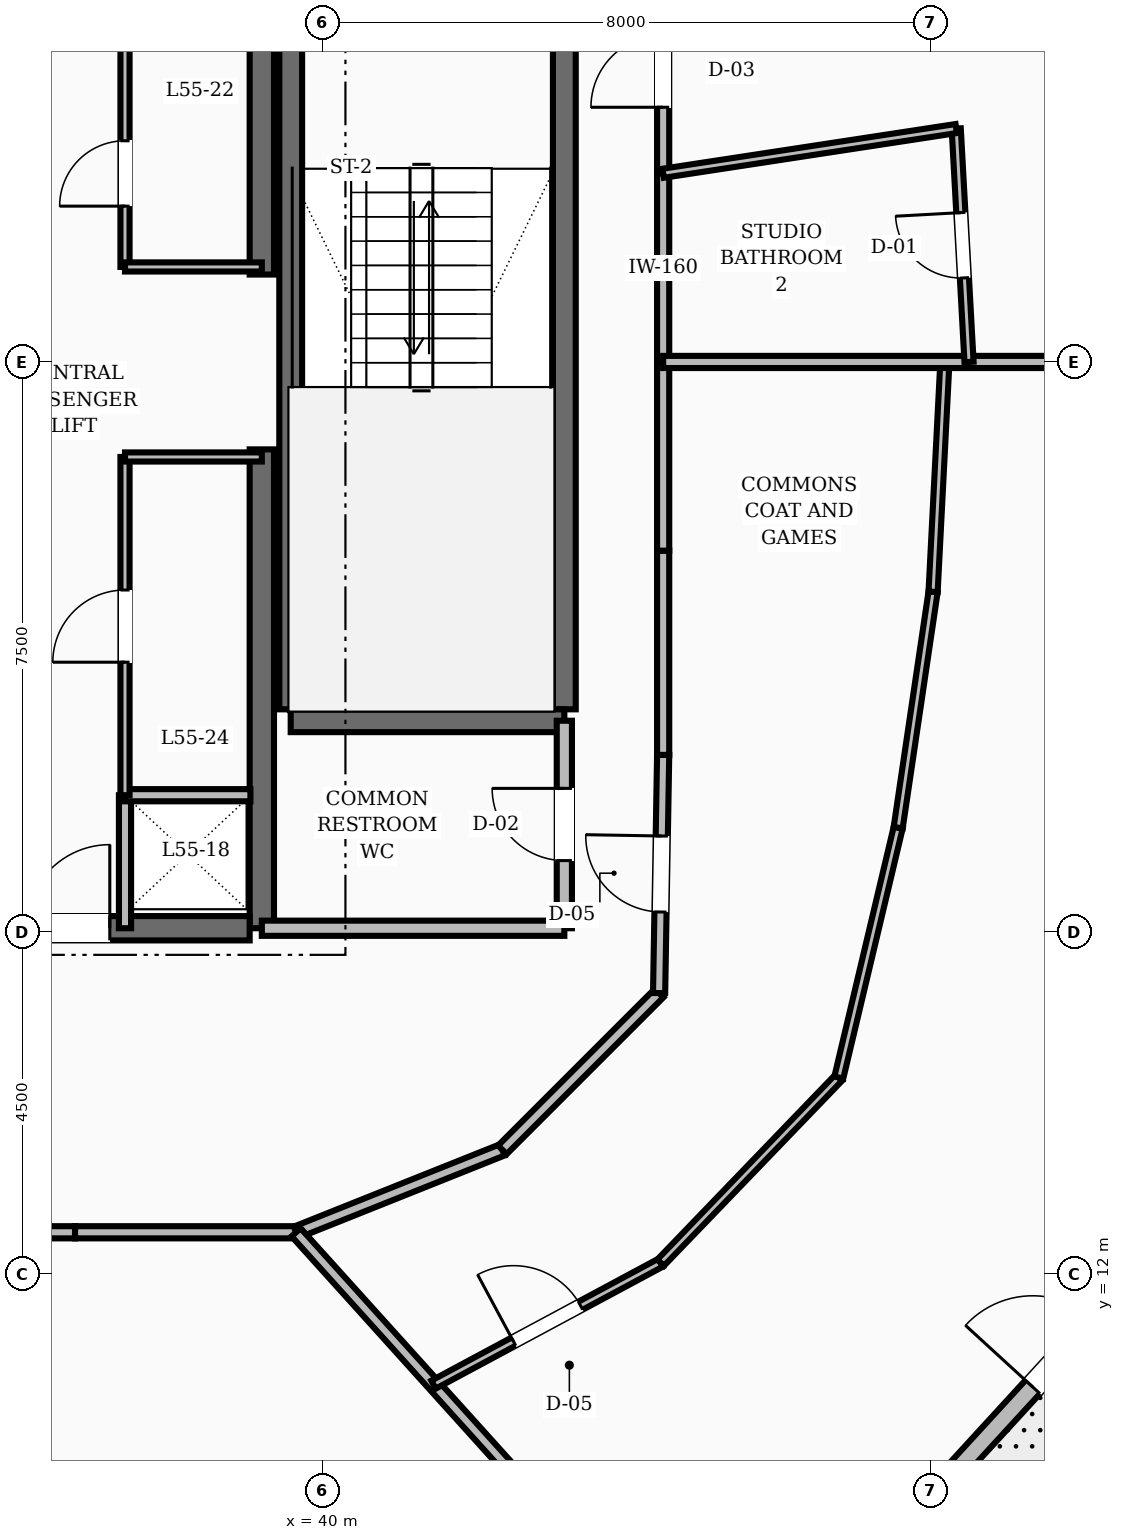
"""IFC4 building model, lengths in metres.
Left out: names, types, materials, properties, quantities, classifications, styles, units other than length and angle.
Written with IfcOpenShell. Run it as: python <this file> out.ifc"""

import sys

from ifc_helpers import new_model, si_unit, direction, frame, frame_2d, origin, place, context, subcontext, project, spatial, rectangle, extrude, element, fill, save


model = new_model("IFC4")
c1 = context("Model", 3, precision=1e-05, world=origin(), true_north=direction((0.0, 1.0)))
c2 = subcontext(c1, "Body", "Model", "MODEL_VIEW")
j1 = project(units=[si_unit("LENGTHUNIT", "METRE"), si_unit("PLANEANGLEUNIT", "RADIAN")], contexts=[c1])
p1 = place(None, origin())
s1 = spatial("IfcSite", under=j1, at=p1, CompositionType="ELEMENT")
p2 = place(p1, origin())
s2 = spatial("IfcBuilding", under=s1, at=p2, CompositionType="ELEMENT")
p3 = place(p2, frame((0.0, 0.0, 214.8)))
s3 = spatial("IfcBuildingStorey", under=s2, at=p3, CompositionType="ELEMENT", Elevation=214.8)
for number, where, z_axis, x_axis in (
    (1, (39.2, 16.55, 0.0), (0.0, 0.0, 1.0), (0.0, 1.0, 0.0)),
    (2, (39.2, 25.15, 0.0), (0.0, 0.0, 1.0), (0.0, 1.0, 0.0)),
):
    element("IfcWall", number, at=place(p3, frame(where, z_axis=z_axis, x_axis=x_axis)), inside=s3, PredefinedType="SHEAR", context=c2, shape_type="SweptSolid", body=[
        extrude(rectangle(XDim=6.3, YDim=0.32, at=frame_2d((3.15, 0.0))), origin(), (0.0, 0.0, 1.0), 3.6),
    ])
p4 = place(p3, frame((35.8, 16.55, 0.0), z_axis=(0.0, 0.0, 1.0), x_axis=(1.0, 0.0, 0.0)))
e3 = element("IfcWall", 3, at=p4, inside=s3, PredefinedType="SHEAR", context=c2, shape_type="SweptSolid", body=[
    extrude(rectangle(XDim=3.24, YDim=0.32, at=frame_2d((1.62, 0.0))), origin(), (0.0, 0.0, 1.0), 3.6),
])
p5 = place(p4, frame((0.3, 0.0, 0.0)))
e4 = element("IfcOpeningElement", 4, at=p5, cuts=e3, PredefinedType="OPENING", context=c2, shape_type="SweptSolid", body=[
    extrude(rectangle(XDim=1.1, YDim=2.1, at=frame_2d((0.55, 1.05))), frame((0.0, 0.17, 0.0), z_axis=(0.0, -1.0, 0.0), x_axis=(1.0, 0.0, 0.0)), (0.0, 0.0, 1.0), 0.34),
])
for number, where, z_axis, x_axis in (
    (5, (43.18, 19.43, 0.0), (0.0, 0.0, 1.0), (0.0, 1.0, 0.0)),
    (6, (39.58, 19.43, 0.0), (0.0, 0.0, 1.0), (0.0, 1.0, 0.0)),
):
    element("IfcWall", number, at=place(p3, frame(where, z_axis=z_axis, x_axis=x_axis)), inside=s3, PredefinedType="SHEAR", context=c2, shape_type="SweptSolid", body=[
        extrude(rectangle(XDim=8.74, YDim=0.3, at=frame_2d((4.37, 0.0))), origin(), (0.0, 0.0, 1.0), 3.6),
    ])
p6 = place(p3, frame((39.58, 19.28, 0.0), z_axis=(0.0, 0.0, 1.0), x_axis=(1.0, 0.0, 0.0)))
e7 = element("IfcWall", 7, at=p6, inside=s3, PredefinedType="SHEAR", context=c2, shape_type="SweptSolid", body=[
    extrude(rectangle(XDim=3.6, YDim=0.3, at=frame_2d((1.8, 0.0))), origin(), (0.0, 0.0, 1.0), 3.6),
])
p7 = place(p3, frame((48.313, 9.392, 0.0), z_axis=(0.0, 0.0, 1.0), x_axis=(0.675617876926, 0.737251981603, 0.0)))
e8 = element("IfcWall", 8, at=p7, inside=s3, PredefinedType="STANDARD", context=c2, shape_type="SweptSolid", body=[
    extrude(rectangle(XDim=4.246, YDim=0.26, at=frame_2d((2.123, 0.0))), origin(), (0.0, 0.0, 1.0), 2.88),
])
p8 = place(p7, frame((1.523, 0.0, 0.0)))
e9 = element("IfcOpeningElement", 9, at=p8, cuts=e8, PredefinedType="OPENING", context=c2, shape_type="SweptSolid", body=[
    extrude(rectangle(XDim=1.2, YDim=2.15, at=frame_2d((0.6, 1.075))), frame((0.0, 0.14, 0.0), z_axis=(0.0, -1.0, 0.0), x_axis=(1.0, 0.0, 0.0)), (0.0, 0.0, 1.0), 0.28),
])
p9 = place(p3, frame((43.18, 16.55, 0.0), z_axis=(0.0, 0.0, 1.0), x_axis=(0.0, 1.0, 0.0)))
e10 = element("IfcWall", 10, at=p9, inside=s3, PredefinedType="SOLIDWALL", context=c2, shape_type="SweptSolid", body=[
    extrude(rectangle(XDim=2.73, YDim=0.2, at=frame_2d((1.365, 0.0))), origin(), (0.0, 0.0, 1.0), 2.87),
])
p10 = place(p9, frame((0.89, 0.0, 0.0)))
e11 = element("IfcOpeningElement", 11, at=p10, cuts=e10, PredefinedType="OPENING", context=c2, shape_type="SweptSolid", body=[
    extrude(rectangle(XDim=0.95, YDim=2.1, at=frame_2d((0.475, 1.05))), frame((0.0, 0.11, 0.0), z_axis=(0.0, -1.0, 0.0), x_axis=(1.0, 0.0, 0.0)), (0.0, 0.0, 1.0), 0.22),
])
p11 = place(p3, frame((39.2, 16.55, 0.0), z_axis=(0.0, 0.0, 1.0), x_axis=(1.0, 0.0, 0.0)))
e12 = element("IfcWall", 12, at=p11, inside=s3, PredefinedType="SOLIDWALL", context=c2, shape_type="SweptSolid", body=[
    extrude(rectangle(XDim=3.98, YDim=0.2, at=frame_2d((1.99, 0.0))), origin(), (0.0, 0.0, 1.0), 2.87),
])
p12 = place(p3, frame((37.4, 16.55, 0.0), z_axis=(0.0, 0.0, 1.0), x_axis=(0.0, 1.0, 0.0)))
e13 = element("IfcWall", 13, at=p12, inside=s3, PredefinedType="SOLIDWALL", context=c2, shape_type="SweptSolid", body=[
    extrude(rectangle(XDim=1.75, YDim=0.16, at=frame_2d((0.875, 0.0))), origin(), (0.0, 0.0, 1.0), 2.87),
])
p13 = place(p3, frame((37.4, 18.3, 0.0), z_axis=(0.0, 0.0, 1.0), x_axis=(1.0, 0.0, 0.0)))
e14 = element("IfcWall", 14, at=p13, inside=s3, PredefinedType="SOLIDWALL", context=c2, shape_type="SweptSolid", body=[
    extrude(rectangle(XDim=1.65, YDim=0.16, at=frame_2d((0.825, 0.0))), origin(), (0.0, 0.0, 1.0), 2.87),
])
p14 = place(p3, frame((37.4, 25.25, 0.0), z_axis=(0.0, 0.0, 1.0), x_axis=(0.0, 1.0, 0.0)))
e15 = element("IfcWall", 15, at=p14, inside=s3, PredefinedType="PARTITIONING", context=c2, shape_type="SweptSolid", body=[
    extrude(rectangle(XDim=6.2, YDim=0.12, at=frame_2d((3.1, 0.0))), origin(), (0.0, 0.0, 1.0), 2.87),
])
p15 = place(p14, frame((0.8, 0.0, 0.0)))
e16 = element("IfcOpeningElement", 16, at=p15, cuts=e15, PredefinedType="OPENING", context=c2, shape_type="SweptSolid", body=[
    extrude(rectangle(XDim=0.86, YDim=2.1, at=frame_2d((0.43, 1.05))), frame((0.0, 0.07, 0.0), z_axis=(0.0, -1.0, 0.0), x_axis=(1.0, 0.0, 0.0)), (0.0, 0.0, 1.0), 0.14),
])
p16 = place(p14, frame((3.8, 0.0, 0.0)))
e17 = element("IfcOpeningElement", 17, at=p16, cuts=e15, PredefinedType="OPENING", context=c2, shape_type="SweptSolid", body=[
    extrude(rectangle(XDim=0.86, YDim=2.1, at=frame_2d((0.43, 1.05))), frame((0.0, 0.07, 0.0), z_axis=(0.0, -1.0, 0.0), x_axis=(1.0, 0.0, 0.0)), (0.0, 0.0, 1.0), 0.14),
])
p17 = place(p3, frame((37.4, 25.25, 0.0), z_axis=(0.0, 0.0, 1.0), x_axis=(1.0, 0.0, 0.0)))
e18 = element("IfcWall", 18, at=p17, inside=s3, PredefinedType="PARTITIONING", context=c2, shape_type="SweptSolid", body=[
    extrude(rectangle(XDim=1.8, YDim=0.12, at=frame_2d((0.9, 0.0))), origin(), (0.0, 0.0, 1.0), 2.87),
])
p18 = place(p3, frame((37.4, 18.3, 0.0), z_axis=(0.0, 0.0, 1.0), x_axis=(0.0, 1.0, 0.0)))
e19 = element("IfcWall", 19, at=p18, inside=s3, PredefinedType="PARTITIONING", context=c2, shape_type="SweptSolid", body=[
    extrude(rectangle(XDim=4.45, YDim=0.12, at=frame_2d((2.225, 0.0))), origin(), (0.0, 0.0, 1.0), 2.87),
])
p19 = place(p18, frame((1.75, 0.0, 0.0)))
e20 = element("IfcOpeningElement", 20, at=p19, cuts=e19, PredefinedType="OPENING", context=c2, shape_type="SweptSolid", body=[
    extrude(rectangle(XDim=0.95, YDim=2.1, at=frame_2d((0.475, 1.05))), frame((0.0, 0.07, 0.0), z_axis=(0.0, -1.0, 0.0), x_axis=(1.0, 0.0, 0.0)), (0.0, 0.0, 1.0), 0.14),
])
p20 = place(p3, frame((37.4, 22.75, 0.0), z_axis=(0.0, 0.0, 1.0), x_axis=(1.0, 0.0, 0.0)))
e21 = element("IfcWall", 21, at=p20, inside=s3, PredefinedType="PARTITIONING", context=c2, shape_type="SweptSolid", body=[
    extrude(rectangle(XDim=1.8, YDim=0.12, at=frame_2d((0.9, 0.0))), origin(), (0.0, 0.0, 1.0), 2.87),
])
p21 = place(p3, frame((44.48, 24.0, 0.0), z_axis=(0.0, 0.0, 1.0), x_axis=(0.0, 1.0, 0.0)))
e22 = element("IfcWall", 22, at=p21, inside=s3, PredefinedType="SOLIDWALL", context=c2, shape_type="SweptSolid", body=[
    extrude(rectangle(XDim=2.482, YDim=0.16, at=frame_2d((1.241, 0.0))), origin(), (0.0, 0.0, 1.0), 2.87),
])
p22 = place(p3, frame((44.48, 26.482, 0.0), z_axis=(0.0, 0.0, 1.0), x_axis=(0.0, 1.0, 0.0)))
e23 = element("IfcWall", 23, at=p22, inside=s3, PredefinedType="SOLIDWALL", context=c2, shape_type="SweptSolid", body=[
    extrude(rectangle(XDim=2.687, YDim=0.16, at=frame_2d((1.344, 0.0))), origin(), (0.0, 0.0, 1.0), 2.87),
])
p23 = place(p22, frame((0.868, 0.0, 0.0)))
e24 = element("IfcOpeningElement", 24, at=p23, cuts=e23, PredefinedType="OPENING", context=c2, shape_type="SweptSolid", body=[
    extrude(rectangle(XDim=0.95, YDim=2.1, at=frame_2d((0.475, 1.05))), frame((0.0, 0.09, 0.0), z_axis=(0.0, -1.0, 0.0), x_axis=(1.0, 0.0, 0.0)), (0.0, 0.0, 1.0), 0.18),
])
p24 = place(p3, frame((34.278, 12.55, 0.0), z_axis=(0.0, 0.0, 1.0), x_axis=(1.0, 0.0, 0.0)))
e25 = element("IfcWall", 25, at=p24, inside=s3, PredefinedType="SOLIDWALL", context=c2, shape_type="SweptSolid", body=[
    extrude(rectangle(XDim=2.465, YDim=0.16, at=frame_2d((1.232, 0.0))), origin(), (0.0, 0.0, 1.0), 2.87),
])
p25 = place(p24, frame((0.733, 0.0, 0.0)))
e26 = element("IfcOpeningElement", 26, at=p25, cuts=e25, PredefinedType="OPENING", context=c2, shape_type="SweptSolid", body=[
    extrude(rectangle(XDim=1.0, YDim=2.1, at=frame_2d((0.5, 1.05))), frame((0.0, 0.09, 0.0), z_axis=(0.0, -1.0, 0.0), x_axis=(1.0, 0.0, 0.0)), (0.0, 0.0, 1.0), 0.18),
])
p26 = place(p3, frame((36.743, 12.55, 0.0), z_axis=(0.0, 0.0, 1.0), x_axis=(1.0, 0.0, 0.0)))
e27 = element("IfcWall", 27, at=p26, inside=s3, PredefinedType="SOLIDWALL", context=c2, shape_type="SweptSolid", body=[
    extrude(rectangle(XDim=2.908, YDim=0.16, at=frame_2d((1.454, 0.0))), origin(), (0.0, 0.0, 1.0), 2.87),
])
p27 = place(p3, frame((39.651, 12.55, 0.0), z_axis=(0.0, 0.0, 1.0), x_axis=(0.92856882165, 0.371160266542, 0.0)))
e28 = element("IfcWall", 28, at=p27, inside=s3, PredefinedType="SOLIDWALL", context=c2, shape_type="SweptSolid", body=[
    extrude(rectangle(XDim=2.923, YDim=0.16, at=frame_2d((1.461, 0.0))), origin(), (0.0, 0.0, 1.0), 2.87),
])
p28 = place(p3, frame((42.365, 13.635, 0.0), z_axis=(0.0, 0.0, 1.0), x_axis=(0.707106781187, 0.707106781187, 0.0)))
e29 = element("IfcWall", 29, at=p28, inside=s3, PredefinedType="SOLIDWALL", context=c2, shape_type="SweptSolid", body=[
    extrude(rectangle(XDim=2.916, YDim=0.16, at=frame_2d((1.458, 0.0))), origin(), (0.0, 0.0, 1.0), 2.87),
])
p29 = place(p3, frame((44.427, 15.697, 0.0), z_axis=(0.0, 0.0, 1.0), x_axis=(0.016981035134, 0.999855811828, 0.0)))
e30 = element("IfcWall", 30, at=p29, inside=s3, PredefinedType="SOLIDWALL", context=c2, shape_type="SweptSolid", body=[
    extrude(rectangle(XDim=3.134, YDim=0.16, at=frame_2d((1.567, 0.0))), origin(), (0.0, 0.0, 1.0), 2.87),
])
p30 = place(p29, frame((1.067, 0.0, 0.0)))
e31 = element("IfcOpeningElement", 31, at=p30, cuts=e30, PredefinedType="OPENING", context=c2, shape_type="SweptSolid", body=[
    extrude(rectangle(XDim=1.0, YDim=2.1, at=frame_2d((0.5, 1.05))), frame((0.0, 0.09, 0.0), z_axis=(0.0, -1.0, 0.0), x_axis=(1.0, 0.0, 0.0)), (0.0, 0.0, 1.0), 0.18),
])
p31 = place(p3, frame((44.48, 18.831, 0.0), z_axis=(0.0, 0.0, 1.0), x_axis=(0.0, 1.0, 0.0)))
e32 = element("IfcWall", 32, at=p31, inside=s3, PredefinedType="SOLIDWALL", context=c2, shape_type="SweptSolid", body=[
    extrude(rectangle(XDim=2.687, YDim=0.16, at=frame_2d((1.344, 0.0))), origin(), (0.0, 0.0, 1.0), 2.87),
])
p32 = place(p3, frame((44.48, 21.518, 0.0), z_axis=(0.0, 0.0, 1.0), x_axis=(0.0, 1.0, 0.0)))
e33 = element("IfcWall", 33, at=p32, inside=s3, PredefinedType="SOLIDWALL", context=c2, shape_type="SweptSolid", body=[
    extrude(rectangle(XDim=2.482, YDim=0.16, at=frame_2d((1.241, 0.0))), origin(), (0.0, 0.0, 1.0), 2.87),
])
p33 = place(p3, frame((39.651, 12.55, 0.0), z_axis=(0.0, 0.0, 1.0), x_axis=(0.669803904272, -0.742538032576, 0.0)))
e34 = element("IfcWall", 34, at=p33, inside=s3, PredefinedType="SOLIDWALL", context=c2, shape_type="SweptSolid", body=[
    extrude(rectangle(XDim=7.663, YDim=0.16, at=frame_2d((3.832, 0.0))), origin(), (0.0, 0.0, 1.0), 2.87),
])
p34 = place(p3, frame((41.459, 10.545, 0.0), z_axis=(0.0, 0.0, 1.0), x_axis=(0.881018320822, 0.473082147597, 0.0)))
e35 = element("IfcWall", 35, at=p34, inside=s3, PredefinedType="PARTITIONING", context=c2, shape_type="SweptSolid", body=[
    extrude(rectangle(XDim=3.392, YDim=0.12, at=frame_2d((1.696, 0.0))), origin(), (0.0, 0.0, 1.0), 2.87),
])
p35 = place(p34, frame((1.196, 0.0, 0.0)))
e36 = element("IfcOpeningElement", 36, at=p35, cuts=e35, PredefinedType="OPENING", context=c2, shape_type="SweptSolid", body=[
    extrude(rectangle(XDim=1.0, YDim=2.1, at=frame_2d((0.5, 1.05))), frame((0.0, 0.07, 0.0), z_axis=(0.0, -1.0, 0.0), x_axis=(1.0, 0.0, 0.0)), (0.0, 0.0, 1.0), 0.14),
])
p36 = place(p3, frame((44.447, 12.15, 0.0), z_axis=(0.0, 0.0, 1.0), x_axis=(0.693436261911, 0.720517973868, 0.0)))
e37 = element("IfcWall", 37, at=p36, inside=s3, PredefinedType="PARTITIONING", context=c2, shape_type="SweptSolid", body=[
    extrude(rectangle(XDim=3.381, YDim=0.12, at=frame_2d((1.69, 0.0))), origin(), (0.0, 0.0, 1.0), 2.87),
])
p37 = place(p3, frame((46.791, 14.586, 0.0), z_axis=(0.0, 0.0, 1.0), x_axis=(0.231161352682, 0.972915427479, 0.0)))
e38 = element("IfcWall", 38, at=p37, inside=s3, PredefinedType="PARTITIONING", context=c2, shape_type="SweptSolid", body=[
    extrude(rectangle(XDim=3.379, YDim=0.12, at=frame_2d((1.689, 0.0))), origin(), (0.0, 0.0, 1.0), 2.87),
])
p38 = place(p3, frame((47.572, 17.873, 0.0), z_axis=(0.0, 0.0, 1.0), x_axis=(0.146399162182, 0.989225598796, 0.0)))
e39 = element("IfcWall", 39, at=p38, inside=s3, PredefinedType="PARTITIONING", context=c2, shape_type="SweptSolid", body=[
    extrude(rectangle(XDim=3.137, YDim=0.12, at=frame_2d((1.568, 0.0))), origin(), (0.0, 0.0, 1.0), 2.87),
])
p39 = place(p3, frame((48.031, 20.976, 0.0), z_axis=(0.0, 0.0, 1.0), x_axis=(0.051276607355, 0.998684489485, 0.0)))
e40 = element("IfcWall", 40, at=p39, inside=s3, PredefinedType="PARTITIONING", context=c2, shape_type="SweptSolid", body=[
    extrude(rectangle(XDim=3.028, YDim=0.12, at=frame_2d((1.514, 0.0))), origin(), (0.0, 0.0, 1.0), 2.87),
])
p40 = place(p3, frame((44.48, 24.0, 0.0), z_axis=(0.0, 0.0, 1.0), x_axis=(1.0, 0.0, 0.0)))
e41 = element("IfcWall", 41, at=p40, inside=s3, PredefinedType="SOLIDWALL", context=c2, shape_type="SweptSolid", body=[
    extrude(rectangle(XDim=10.54, YDim=0.16, at=frame_2d((5.27, 0.0))), origin(), (0.0, 0.0, 1.0), 2.87),
])
p41 = place(p3, frame((48.504, 24.0, 0.0), z_axis=(0.0, 0.0, 1.0), x_axis=(-0.054779672564, 0.998498466435, 0.0)))
e42 = element("IfcWall", 42, at=p41, inside=s3, PredefinedType="PARTITIONING", context=c2, shape_type="SweptSolid", body=[
    extrude(rectangle(XDim=3.075, YDim=0.12, at=frame_2d((1.538, 0.0))), origin(), (0.0, 0.0, 1.0), 2.87),
])
p42 = place(p41, frame((1.108, 0.0, 0.0)))
e43 = element("IfcOpeningElement", 43, at=p42, cuts=e42, PredefinedType="OPENING", context=c2, shape_type="SweptSolid", body=[
    extrude(rectangle(XDim=0.86, YDim=2.1, at=frame_2d((0.43, 1.05))), frame((0.0, 0.07, 0.0), z_axis=(0.0, -1.0, 0.0), x_axis=(1.0, 0.0, 0.0)), (0.0, 0.0, 1.0), 0.14),
])
p43 = place(p3, frame((44.48, 26.482, 0.0), z_axis=(0.0, 0.0, 1.0), x_axis=(0.988565547882, 0.150791768812, 0.0)))
e44 = element("IfcWall", 44, at=p43, inside=s3, PredefinedType="PARTITIONING", context=c2, shape_type="SweptSolid", body=[
    extrude(rectangle(XDim=3.9, YDim=0.12, at=frame_2d((1.95, 0.0))), origin(), (0.0, 0.0, 1.0), 2.87),
])
p44 = place(p8, origin())
e45 = element("IfcDoor", 45, at=p44, inside=s3, OperationType="SINGLE_SWING_LEFT", PredefinedType="DOOR", context=c2, shape_type="SweptSolid", body=[
    extrude(rectangle(XDim=1.2, YDim=2.15, at=frame_2d((0.6, 1.075))), frame((0.0, 0.025, 0.0), z_axis=(0.0, -1.0, 0.0), x_axis=(1.0, 0.0, 0.0)), (0.0, 0.0, 1.0), 0.05),
])
fill(e9, e45)
p45 = place(p10, origin())
e46 = element("IfcDoor", 46, at=p45, inside=s3, OperationType="SINGLE_SWING_RIGHT", PredefinedType="DOOR", context=c2, shape_type="SweptSolid", body=[
    extrude(rectangle(XDim=0.95, YDim=2.1, at=frame_2d((0.475, 1.05))), frame((0.0, 0.025, 0.0), z_axis=(0.0, -1.0, 0.0), x_axis=(1.0, 0.0, 0.0)), (0.0, 0.0, 1.0), 0.05),
])
fill(e11, e46)
p46 = place(p5, origin())
e47 = element("IfcDoor", 47, at=p46, inside=s3, OperationType="SINGLE_SWING_RIGHT", PredefinedType="DOOR", context=c2, shape_type="SweptSolid", body=[
    extrude(rectangle(XDim=1.1, YDim=2.1, at=frame_2d((0.55, 1.05))), frame((0.0, 0.025, 0.0), z_axis=(0.0, -1.0, 0.0), x_axis=(1.0, 0.0, 0.0)), (0.0, 0.0, 1.0), 0.05),
])
fill(e4, e47)
p47 = place(p15, origin())
e48 = element("IfcDoor", 48, at=p47, inside=s3, OperationType="SINGLE_SWING_LEFT", PredefinedType="DOOR", context=c2, shape_type="SweptSolid", body=[
    extrude(rectangle(XDim=0.86, YDim=2.1, at=frame_2d((0.43, 1.05))), frame((0.0, 0.025, 0.0), z_axis=(0.0, -1.0, 0.0), x_axis=(1.0, 0.0, 0.0)), (0.0, 0.0, 1.0), 0.05),
])
fill(e16, e48)
p48 = place(p19, origin())
e49 = element("IfcDoor", 49, at=p48, inside=s3, OperationType="SINGLE_SWING_LEFT", PredefinedType="DOOR", context=c2, shape_type="SweptSolid", body=[
    extrude(rectangle(XDim=0.95, YDim=2.1, at=frame_2d((0.475, 1.05))), frame((0.0, 0.025, 0.0), z_axis=(0.0, -1.0, 0.0), x_axis=(1.0, 0.0, 0.0)), (0.0, 0.0, 1.0), 0.05),
])
fill(e20, e49)
p49 = place(p30, origin())
e50 = element("IfcDoor", 50, at=p49, inside=s3, OperationType="SINGLE_SWING_RIGHT", PredefinedType="DOOR", context=c2, shape_type="SweptSolid", body=[
    extrude(rectangle(XDim=1.0, YDim=2.1, at=frame_2d((0.5, 1.05))), frame((0.0, 0.025, 0.0), z_axis=(0.0, -1.0, 0.0), x_axis=(1.0, 0.0, 0.0)), (0.0, 0.0, 1.0), 0.05),
])
fill(e31, e50)
p50 = place(p35, origin())
e51 = element("IfcDoor", 51, at=p50, inside=s3, OperationType="SINGLE_SWING_LEFT", PredefinedType="DOOR", context=c2, shape_type="SweptSolid", body=[
    extrude(rectangle(XDim=1.0, YDim=2.1, at=frame_2d((0.5, 1.05))), frame((0.0, 0.025, 0.0), z_axis=(0.0, -1.0, 0.0), x_axis=(1.0, 0.0, 0.0)), (0.0, 0.0, 1.0), 0.05),
])
fill(e36, e51)
p51 = place(p42, origin())
e52 = element("IfcDoor", 52, at=p51, inside=s3, OperationType="SINGLE_SWING_RIGHT", PredefinedType="DOOR", context=c2, shape_type="SweptSolid", body=[
    extrude(rectangle(XDim=0.86, YDim=2.1, at=frame_2d((0.43, 1.05))), frame((0.0, 0.025, 0.0), z_axis=(0.0, -1.0, 0.0), x_axis=(1.0, 0.0, 0.0)), (0.0, 0.0, 1.0), 0.05),
])
fill(e43, e52)
p52 = place(p23, origin())
e53 = element("IfcDoor", 53, at=p52, inside=s3, OperationType="SINGLE_SWING_LEFT", PredefinedType="DOOR", context=c2, shape_type="SweptSolid", body=[
    extrude(rectangle(XDim=0.95, YDim=2.1, at=frame_2d((0.475, 1.05))), frame((0.0, 0.025, 0.0), z_axis=(0.0, -1.0, 0.0), x_axis=(1.0, 0.0, 0.0)), (0.0, 0.0, 1.0), 0.05),
])
fill(e24, e53)
save(model, sys.argv[1])
